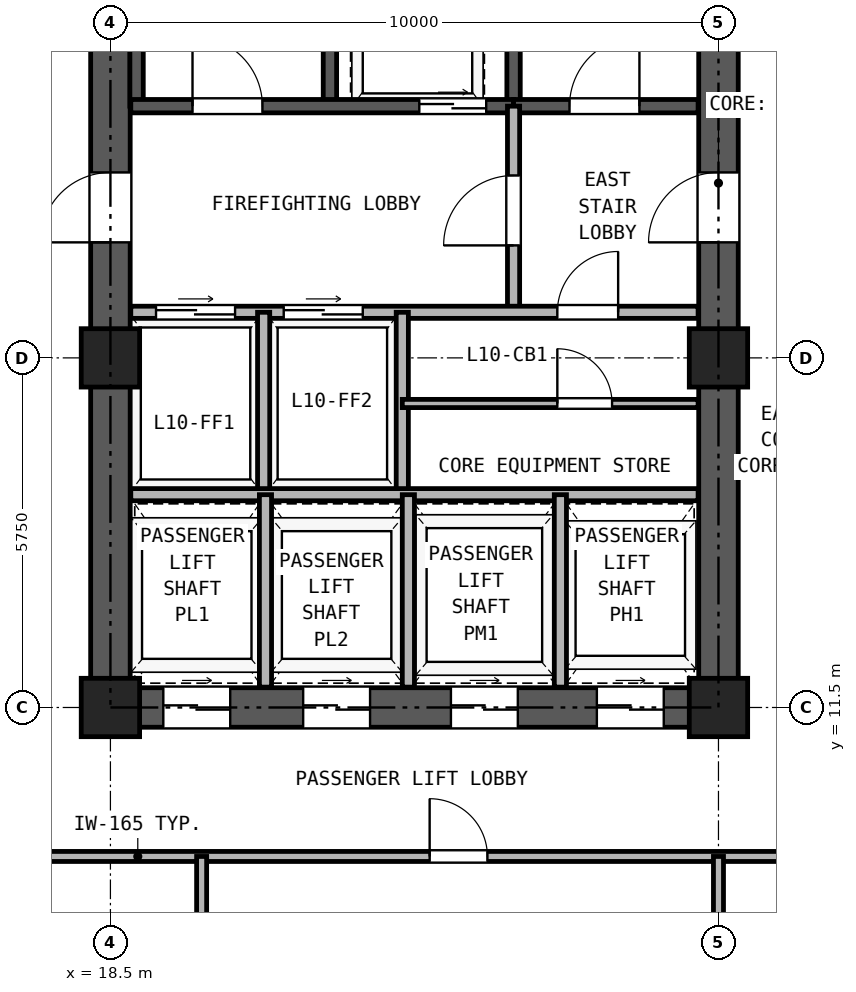
"""IFC4 building model, lengths in metres.
Left out: names, types, materials, properties, quantities, classifications, styles, units other than length and angle.
Written with IfcOpenShell. Run it as: python <this file> out.ifc"""

import sys

from ifc_helpers import new_model, si_unit, direction, frame, frame_2d, origin, origin_2d, place, context, subcontext, project, spatial, rectangle, hollow_rectangle, extrude, source, transform, mapped, element, fill, save


model = new_model("IFC4")
c1 = context("Model", 3, precision=1e-05, world=origin(), true_north=direction((0.0, 1.0)))
c2 = subcontext(c1, "Body", "Model", "MODEL_VIEW")
j1 = project(units=[si_unit("LENGTHUNIT", "METRE"), si_unit("PLANEANGLEUNIT", "RADIAN")], contexts=[c1])
p1 = place(None, origin())
s1 = spatial("IfcSite", under=j1, at=p1, CompositionType="ELEMENT")
p2 = place(p1, origin())
s2 = spatial("IfcBuilding", under=s1, at=p2, CompositionType="ELEMENT")
p3 = place(p2, frame((0.0, 0.0, 40.5)))
s3 = spatial("IfcBuildingStorey", under=s2, at=p3, CompositionType="ELEMENT", Elevation=40.5)
m1 = source(origin(), c2, "Body", "SweptSolid", [
    extrude(hollow_rectangle(XDim=0.96, YDim=0.96, WallThickness=0.06, at=origin_2d()), origin(), (0.0, 0.0, 1.0), 3.32),
])
for number, where, z_axis, x_axis in (
    (1, (18.5, 11.5, 0.0), (0.0, 0.0, 1.0), (1.0, 0.0, 0.0)),
    (2, (18.5, 17.25, 0.0), (0.0, 0.0, 1.0), (1.0, 0.0, 0.0)),
    (3, (28.5, 11.5, 0.0), (0.0, 0.0, 1.0), (1.0, 0.0, 0.0)),
    (4, (28.5, 17.25, 0.0), (0.0, 0.0, 1.0), (1.0, 0.0, 0.0)),
):
    element("IfcColumn", number, at=place(p3, frame(where, z_axis=z_axis, x_axis=x_axis)), inside=s3, PredefinedType="COLUMN", context=c2, shape_type="MappedRepresentation", body=[
        mapped(m1, transform((0.0, 0.0, 0.0), x_axis=(1.0, 0.0, 0.0), y_axis=(0.0, 1.0, 0.0), z_axis=(0.0, 0.0, 1.0), scale=1.0)),
    ])
p4 = place(p3, frame((18.175, 11.5, 0.0), z_axis=(0.0, 0.0, 1.0), x_axis=(1.0, 0.0, 0.0)))
e5 = element("IfcWall", 5, at=p4, inside=s3, PredefinedType="SHEAR", context=c2, shape_type="SweptSolid", body=[
    extrude(rectangle(XDim=10.65, YDim=0.65, at=frame_2d((5.325, 0.0))), origin(), (0.0, 0.0, 1.0), 3.32),
])
p5 = place(p4, frame((1.195, 0.0, 0.0)))
e6 = element("IfcOpeningElement", 6, at=p5, cuts=e5, PredefinedType="OPENING", context=c2, shape_type="SweptSolid", body=[
    extrude(rectangle(XDim=1.1, YDim=2.25, at=frame_2d((0.55, 1.125))), frame((0.0, 0.335, 0.0), z_axis=(0.0, -1.0, 0.0), x_axis=(1.0, 0.0, 0.0)), (0.0, 0.0, 1.0), 0.67),
])
p6 = place(p4, frame((3.495, 0.0, 0.0)))
e7 = element("IfcOpeningElement", 7, at=p6, cuts=e5, PredefinedType="OPENING", context=c2, shape_type="SweptSolid", body=[
    extrude(rectangle(XDim=1.1, YDim=2.25, at=frame_2d((0.55, 1.125))), frame((0.0, 0.335, 0.0), z_axis=(0.0, -1.0, 0.0), x_axis=(1.0, 0.0, 0.0)), (0.0, 0.0, 1.0), 0.67),
])
p7 = place(p4, frame((5.925, 0.0, 0.0)))
e8 = element("IfcOpeningElement", 8, at=p7, cuts=e5, PredefinedType="OPENING", context=c2, shape_type="SweptSolid", body=[
    extrude(rectangle(XDim=1.1, YDim=2.25, at=frame_2d((0.55, 1.125))), frame((0.0, 0.335, 0.0), z_axis=(0.0, -1.0, 0.0), x_axis=(1.0, 0.0, 0.0)), (0.0, 0.0, 1.0), 0.67),
])
p8 = place(p4, frame((8.325, 0.0, 0.0)))
e9 = element("IfcOpeningElement", 9, at=p8, cuts=e5, PredefinedType="OPENING", context=c2, shape_type="SweptSolid", body=[
    extrude(rectangle(XDim=1.1, YDim=2.25, at=frame_2d((0.55, 1.125))), frame((0.0, 0.335, 0.0), z_axis=(0.0, -1.0, 0.0), x_axis=(1.0, 0.0, 0.0)), (0.0, 0.0, 1.0), 0.67),
])
p9 = place(p3, frame((18.5, 11.825, 0.0), z_axis=(0.0, 0.0, 1.0), x_axis=(0.0, 1.0, 0.0)))
e10 = element("IfcWall", 10, at=p9, inside=s3, PredefinedType="SHEAR", context=c2, shape_type="SweptSolid", body=[
    extrude(rectangle(XDim=16.6, YDim=0.65, at=frame_2d((8.3, 0.0))), origin(), (0.0, 0.0, 1.0), 3.32),
])
p10 = place(p9, frame((7.325, 0.0, 0.0)))
e11 = element("IfcOpeningElement", 11, at=p10, cuts=e10, PredefinedType="OPENING", context=c2, shape_type="SweptSolid", body=[
    extrude(rectangle(XDim=1.15, YDim=2.2, at=frame_2d((0.575, 1.1))), frame((0.0, 0.335, 0.0), z_axis=(0.0, -1.0, 0.0), x_axis=(1.0, 0.0, 0.0)), (0.0, 0.0, 1.0), 0.67),
])
p11 = place(p3, frame((28.5, 11.825, 0.0), z_axis=(0.0, 0.0, 1.0), x_axis=(0.0, 1.0, 0.0)))
e12 = element("IfcWall", 12, at=p11, inside=s3, PredefinedType="SHEAR", context=c2, shape_type="SweptSolid", body=[
    extrude(rectangle(XDim=16.6, YDim=0.65, at=frame_2d((8.3, 0.0))), origin(), (0.0, 0.0, 1.0), 3.32),
])
p12 = place(p11, frame((7.325, 0.0, 0.0)))
e13 = element("IfcOpeningElement", 13, at=p12, cuts=e12, PredefinedType="OPENING", context=c2, shape_type="SweptSolid", body=[
    extrude(rectangle(XDim=1.15, YDim=2.2, at=frame_2d((0.575, 1.1))), frame((0.0, 0.335, 0.0), z_axis=(0.0, -1.0, 0.0), x_axis=(1.0, 0.0, 0.0)), (0.0, 0.0, 1.0), 0.67),
])
for number, where, z_axis, x_axis in (
    (14, (18.93, 21.39, 0.0), (0.0, 0.0, 1.0), (0.0, 1.0, 0.0)),
    (15, (22.11, 21.39, 0.0), (0.0, 0.0, 1.0), (0.0, 1.0, 0.0)),
    (16, (25.13, 21.39, 0.0), (0.0, 0.0, 1.0), (0.0, 1.0, 0.0)),
):
    element("IfcWall", number, at=place(p3, frame(where, z_axis=z_axis, x_axis=x_axis)), inside=s3, PredefinedType="SOLIDWALL", context=c2, shape_type="SweptSolid", body=[
        extrude(rectangle(XDim=7.11, YDim=0.22, at=frame_2d((3.555, 0.0))), origin(), (0.0, 0.0, 1.0), 3.32),
    ])
p13 = place(p3, frame((18.835, 21.39, 0.0), z_axis=(0.0, 0.0, 1.0), x_axis=(1.0, 0.0, 0.0)))
e17 = element("IfcWall", 17, at=p13, inside=s3, PredefinedType="SOLIDWALL", context=c2, shape_type="SweptSolid", body=[
    extrude(rectangle(XDim=6.295, YDim=0.22, at=frame_2d((3.147, 0.0))), origin(), (0.0, 0.0, 1.0), 3.32),
])
p14 = place(p13, frame((1.015, 0.0, 0.0)))
e18 = element("IfcOpeningElement", 18, at=p14, cuts=e17, PredefinedType="OPENING", context=c2, shape_type="SweptSolid", body=[
    extrude(rectangle(XDim=1.15, YDim=2.2, at=frame_2d((0.575, 1.1))), frame((0.0, 0.12, 0.0), z_axis=(0.0, -1.0, 0.0), x_axis=(1.0, 0.0, 0.0)), (0.0, 0.0, 1.0), 0.24),
])
p15 = place(p13, frame((4.745, 0.0, 0.0)))
e19 = element("IfcOpeningElement", 19, at=p15, cuts=e17, PredefinedType="OPENING", context=c2, shape_type="SweptSolid", body=[
    extrude(rectangle(XDim=1.1, YDim=2.25, at=frame_2d((0.55, 1.125))), frame((0.0, 0.12, 0.0), z_axis=(0.0, -1.0, 0.0), x_axis=(1.0, 0.0, 0.0)), (0.0, 0.0, 1.0), 0.24),
])
p16 = place(p3, frame((25.13, 21.39, 0.0), z_axis=(0.0, 0.0, 1.0), x_axis=(1.0, 0.0, 0.0)))
e20 = element("IfcWall", 20, at=p16, inside=s3, PredefinedType="SOLIDWALL", context=c2, shape_type="SweptSolid", body=[
    extrude(rectangle(XDim=3.035, YDim=0.22, at=frame_2d((1.518, 0.0))), origin(), (0.0, 0.0, 1.0), 3.32),
])
p17 = place(p16, frame((0.92, 0.0, 0.0)))
e21 = element("IfcOpeningElement", 21, at=p17, cuts=e20, PredefinedType="OPENING", context=c2, shape_type="SweptSolid", body=[
    extrude(rectangle(XDim=1.15, YDim=2.2, at=frame_2d((0.575, 1.1))), frame((0.0, 0.12, 0.0), z_axis=(0.0, -1.0, 0.0), x_axis=(1.0, 0.0, 0.0)), (0.0, 0.0, 1.0), 0.24),
])
p18 = place(p3, frame((25.13, 18.0, 0.0), z_axis=(0.0, 0.0, 1.0), x_axis=(0.0, 1.0, 0.0)))
e22 = element("IfcWall", 22, at=p18, inside=s3, PredefinedType="PARTITIONING", context=c2, shape_type="SweptSolid", body=[
    extrude(rectangle(XDim=3.39, YDim=0.2, at=frame_2d((1.695, 0.0))), origin(), (0.0, 0.0, 1.0), 3.32),
])
p19 = place(p18, frame((1.1, 0.0, 0.0)))
e23 = element("IfcOpeningElement", 23, at=p19, cuts=e22, PredefinedType="OPENING", context=c2, shape_type="SweptSolid", body=[
    extrude(rectangle(XDim=1.15, YDim=2.2, at=frame_2d((0.575, 1.1))), frame((0.0, 0.11, 0.0), z_axis=(0.0, -1.0, 0.0), x_axis=(1.0, 0.0, 0.0)), (0.0, 0.0, 1.0), 0.22),
])
p20 = place(p3, frame((18.835, 18.0, 0.0), z_axis=(0.0, 0.0, 1.0), x_axis=(1.0, 0.0, 0.0)))
e24 = element("IfcWall", 24, at=p20, inside=s3, PredefinedType="PARTITIONING", context=c2, shape_type="SweptSolid", body=[
    extrude(rectangle(XDim=9.33, YDim=0.2, at=frame_2d((4.665, 0.0))), origin(), (0.0, 0.0, 1.0), 3.32),
])
p21 = place(p20, frame((0.415, 0.0, 0.0)))
e25 = element("IfcOpeningElement", 25, at=p21, cuts=e24, PredefinedType="OPENING", context=c2, shape_type="SweptSolid", body=[
    extrude(rectangle(XDim=1.3, YDim=2.3, at=frame_2d((0.65, 1.15))), frame((0.0, 0.11, 0.0), z_axis=(0.0, -1.0, 0.0), x_axis=(1.0, 0.0, 0.0)), (0.0, 0.0, 1.0), 0.22),
])
p22 = place(p20, frame((2.515, 0.0, 0.0)))
e26 = element("IfcOpeningElement", 26, at=p22, cuts=e24, PredefinedType="OPENING", context=c2, shape_type="SweptSolid", body=[
    extrude(rectangle(XDim=1.3, YDim=2.3, at=frame_2d((0.65, 1.15))), frame((0.0, 0.11, 0.0), z_axis=(0.0, -1.0, 0.0), x_axis=(1.0, 0.0, 0.0)), (0.0, 0.0, 1.0), 0.22),
])
p23 = place(p20, frame((7.015, 0.0, 0.0)))
e27 = element("IfcOpeningElement", 27, at=p23, cuts=e24, PredefinedType="OPENING", context=c2, shape_type="SweptSolid", body=[
    extrude(rectangle(XDim=1.0, YDim=2.15, at=frame_2d((0.5, 1.075))), frame((0.0, 0.11, 0.0), z_axis=(0.0, -1.0, 0.0), x_axis=(1.0, 0.0, 0.0)), (0.0, 0.0, 1.0), 0.22),
])
for number, where, z_axis, x_axis in (
    (28, (21.02, 15.0, 0.0), (0.0, 0.0, 1.0), (0.0, 1.0, 0.0)),
    (29, (23.3, 15.0, 0.0), (0.0, 0.0, 1.0), (0.0, 1.0, 0.0)),
):
    element("IfcWall", number, at=place(p3, frame(where, z_axis=z_axis, x_axis=x_axis)), inside=s3, PredefinedType="PARTITIONING", context=c2, shape_type="SweptSolid", body=[
        extrude(rectangle(XDim=3.0, YDim=0.2, at=frame_2d((1.5, 0.0))), origin(), (0.0, 0.0, 1.0), 3.32),
    ])
p24 = place(p3, frame((18.835, 15.0, 0.0), z_axis=(0.0, 0.0, 1.0), x_axis=(1.0, 0.0, 0.0)))
e30 = element("IfcWall", 30, at=p24, inside=s3, PredefinedType="PARTITIONING", context=c2, shape_type="SweptSolid", body=[
    extrude(rectangle(XDim=9.33, YDim=0.2, at=frame_2d((4.665, 0.0))), origin(), (0.0, 0.0, 1.0), 3.32),
])
p25 = place(p3, frame((23.3, 16.5, 0.0), z_axis=(0.0, 0.0, 1.0), x_axis=(1.0, 0.0, 0.0)))
e31 = element("IfcWall", 31, at=p25, inside=s3, PredefinedType="PARTITIONING", context=c2, shape_type="SweptSolid", body=[
    extrude(rectangle(XDim=4.865, YDim=0.135, at=frame_2d((2.433, 0.0))), origin(), (0.0, 0.0, 1.0), 3.32),
])
p26 = place(p25, frame((2.55, 0.0, 0.0)))
e32 = element("IfcOpeningElement", 32, at=p26, cuts=e31, PredefinedType="OPENING", context=c2, shape_type="SweptSolid", body=[
    extrude(rectangle(XDim=0.9, YDim=2.05, at=frame_2d((0.45, 1.025))), frame((0.0, 0.077, 0.0), z_axis=(0.0, -1.0, 0.0), x_axis=(1.0, 0.0, 0.0)), (0.0, 0.0, 1.0), 0.155),
])
for number, where, z_axis, x_axis in (
    (33, (21.05, 11.835, 0.0), (0.0, 0.0, 1.0), (0.0, 1.0, 0.0)),
    (34, (23.4, 11.835, 0.0), (0.0, 0.0, 1.0), (0.0, 1.0, 0.0)),
    (35, (25.9, 11.835, 0.0), (0.0, 0.0, 1.0), (0.0, 1.0, 0.0)),
):
    element("IfcWall", number, at=place(p3, frame(where, z_axis=z_axis, x_axis=x_axis)), inside=s3, PredefinedType="PARTITIONING", context=c2, shape_type="SweptSolid", body=[
        extrude(rectangle(XDim=3.165, YDim=0.2, at=frame_2d((1.583, 0.0))), origin(), (0.0, 0.0, 1.0), 3.32),
    ])
p27 = place(p3, frame((7.4, 9.05, 0.0), z_axis=(0.0, 0.0, 1.0), x_axis=(1.0, 0.0, 0.0)))
e36 = element("IfcWall", 36, at=p27, inside=s3, PredefinedType="PARTITIONING", context=c2, shape_type="SweptSolid", body=[
    extrude(rectangle(XDim=32.2, YDim=0.165, at=frame_2d((16.1, 0.0))), origin(), (0.0, 0.0, 1.0), 3.32),
])
p28 = place(p27, frame((5.8, 0.0, 0.0)))
e37 = element("IfcOpeningElement", 37, at=p28, cuts=e36, PredefinedType="OPENING", context=c2, shape_type="SweptSolid", body=[
    extrude(rectangle(XDim=0.95, YDim=2.15, at=frame_2d((0.475, 1.075))), frame((0.0, 0.093, 0.0), z_axis=(0.0, -1.0, 0.0), x_axis=(1.0, 0.0, 0.0)), (0.0, 0.0, 1.0), 0.185),
])
p29 = place(p27, frame((16.35, 0.0, 0.0)))
e38 = element("IfcOpeningElement", 38, at=p29, cuts=e36, PredefinedType="OPENING", context=c2, shape_type="SweptSolid", body=[
    extrude(rectangle(XDim=0.95, YDim=2.15, at=frame_2d((0.475, 1.075))), frame((0.0, 0.093, 0.0), z_axis=(0.0, -1.0, 0.0), x_axis=(1.0, 0.0, 0.0)), (0.0, 0.0, 1.0), 0.185),
])
p30 = place(p27, frame((23.6, 0.0, 0.0)))
e39 = element("IfcOpeningElement", 39, at=p30, cuts=e36, PredefinedType="OPENING", context=c2, shape_type="SweptSolid", body=[
    extrude(rectangle(XDim=0.95, YDim=2.15, at=frame_2d((0.475, 1.075))), frame((0.0, 0.093, 0.0), z_axis=(0.0, -1.0, 0.0), x_axis=(1.0, 0.0, 0.0)), (0.0, 0.0, 1.0), 0.185),
])
p31 = place(p27, frame((27.95, 0.0, 0.0)))
e40 = element("IfcOpeningElement", 40, at=p31, cuts=e36, PredefinedType="OPENING", context=c2, shape_type="SweptSolid", body=[
    extrude(rectangle(XDim=0.92, YDim=2.1, at=frame_2d((0.46, 1.05))), frame((0.0, 0.093, 0.0), z_axis=(0.0, -1.0, 0.0), x_axis=(1.0, 0.0, 0.0)), (0.0, 0.0, 1.0), 0.185),
])
p32 = place(p27, frame((30.5, 0.0, 0.0)))
e41 = element("IfcOpeningElement", 41, at=p32, cuts=e36, PredefinedType="OPENING", context=c2, shape_type="SweptSolid", body=[
    extrude(rectangle(XDim=0.92, YDim=2.1, at=frame_2d((0.46, 1.05))), frame((0.0, 0.093, 0.0), z_axis=(0.0, -1.0, 0.0), x_axis=(1.0, 0.0, 0.0)), (0.0, 0.0, 1.0), 0.185),
])
p33 = place(p3, frame((20.0, 0.16, 0.0), z_axis=(0.0, 0.0, 1.0), x_axis=(0.0, 1.0, 0.0)))
e42 = element("IfcWall", 42, at=p33, inside=s3, PredefinedType="PARTITIONING", context=c2, shape_type="SweptSolid", body=[
    extrude(rectangle(XDim=8.89, YDim=0.165, at=frame_2d((4.445, 0.0))), origin(), (0.0, 0.0, 1.0), 3.32),
])
p34 = place(p3, frame((28.5, 0.16, 0.0), z_axis=(0.0, 0.0, 1.0), x_axis=(0.0, 1.0, 0.0)))
e43 = element("IfcWall", 43, at=p34, inside=s3, PredefinedType="PARTITIONING", context=c2, shape_type="SweptSolid", body=[
    extrude(rectangle(XDim=8.89, YDim=0.165, at=frame_2d((4.445, 0.0))), origin(), (0.0, 0.0, 1.0), 2.539),
])
p35 = place(p14, frame((1.15, 0.0, 0.0), z_axis=(0.0, 0.0, 1.0), x_axis=(-1.0, 0.0, 0.0)))
e44 = element("IfcDoor", 44, at=p35, inside=s3, OperationType="SINGLE_SWING_LEFT", PredefinedType="DOOR", context=c2, shape_type="SweptSolid", body=[
    extrude(rectangle(XDim=1.15, YDim=2.2, at=frame_2d((0.575, 1.1))), frame((0.0, 0.025, 0.0), z_axis=(0.0, -1.0, 0.0), x_axis=(1.0, 0.0, 0.0)), (0.0, 0.0, 1.0), 0.05),
])
fill(e18, e44)
p36 = place(p17, frame((1.15, 0.0, 0.0), z_axis=(0.0, 0.0, 1.0), x_axis=(-1.0, 0.0, 0.0)))
e45 = element("IfcDoor", 45, at=p36, inside=s3, OperationType="SINGLE_SWING_RIGHT", PredefinedType="DOOR", context=c2, shape_type="SweptSolid", body=[
    extrude(rectangle(XDim=1.15, YDim=2.2, at=frame_2d((0.575, 1.1))), frame((0.0, 0.025, 0.0), z_axis=(0.0, -1.0, 0.0), x_axis=(1.0, 0.0, 0.0)), (0.0, 0.0, 1.0), 0.05),
])
fill(e21, e45)
p37 = place(p15, frame((1.1, 0.0, 0.0), z_axis=(0.0, 0.0, 1.0), x_axis=(-1.0, 0.0, 0.0)))
e46 = element("IfcDoor", 46, at=p37, inside=s3, OperationType="DOUBLE_DOOR_SLIDING", PredefinedType="DOOR", context=c2, shape_type="SweptSolid", body=[
    extrude(rectangle(XDim=1.1, YDim=2.25, at=frame_2d((0.55, 1.125))), frame((0.0, 0.025, 0.0), z_axis=(0.0, -1.0, 0.0), x_axis=(1.0, 0.0, 0.0)), (0.0, 0.0, 1.0), 0.05),
])
fill(e19, e46)
p38 = place(p19, origin())
e47 = element("IfcDoor", 47, at=p38, inside=s3, OperationType="SINGLE_SWING_LEFT", PredefinedType="DOOR", context=c2, shape_type="SweptSolid", body=[
    extrude(rectangle(XDim=1.15, YDim=2.2, at=frame_2d((0.575, 1.1))), frame((0.0, 0.025, 0.0), z_axis=(0.0, -1.0, 0.0), x_axis=(1.0, 0.0, 0.0)), (0.0, 0.0, 1.0), 0.05),
])
fill(e23, e47)
p39 = place(p21, origin())
e48 = element("IfcDoor", 48, at=p39, inside=s3, OperationType="DOUBLE_DOOR_SLIDING", PredefinedType="DOOR", context=c2, shape_type="SweptSolid", body=[
    extrude(rectangle(XDim=1.3, YDim=2.3, at=frame_2d((0.65, 1.15))), frame((0.0, 0.025, 0.0), z_axis=(0.0, -1.0, 0.0), x_axis=(1.0, 0.0, 0.0)), (0.0, 0.0, 1.0), 0.05),
])
fill(e25, e48)
p40 = place(p22, origin())
e49 = element("IfcDoor", 49, at=p40, inside=s3, OperationType="DOUBLE_DOOR_SLIDING", PredefinedType="DOOR", context=c2, shape_type="SweptSolid", body=[
    extrude(rectangle(XDim=1.3, YDim=2.3, at=frame_2d((0.65, 1.15))), frame((0.0, 0.025, 0.0), z_axis=(0.0, -1.0, 0.0), x_axis=(1.0, 0.0, 0.0)), (0.0, 0.0, 1.0), 0.05),
])
fill(e26, e49)
p41 = place(p23, frame((1.0, 0.0, 0.0), z_axis=(0.0, 0.0, 1.0), x_axis=(-1.0, 0.0, 0.0)))
e50 = element("IfcDoor", 50, at=p41, inside=s3, OperationType="SINGLE_SWING_RIGHT", PredefinedType="DOOR", context=c2, shape_type="SweptSolid", body=[
    extrude(rectangle(XDim=1.0, YDim=2.15, at=frame_2d((0.5, 1.075))), frame((0.0, 0.025, 0.0), z_axis=(0.0, -1.0, 0.0), x_axis=(1.0, 0.0, 0.0)), (0.0, 0.0, 1.0), 0.05),
])
fill(e27, e50)
p42 = place(p26, frame((0.9, 0.0, 0.0), z_axis=(0.0, 0.0, 1.0), x_axis=(-1.0, 0.0, 0.0)))
e51 = element("IfcDoor", 51, at=p42, inside=s3, OperationType="SINGLE_SWING_LEFT", PredefinedType="DOOR", context=c2, shape_type="SweptSolid", body=[
    extrude(rectangle(XDim=0.9, YDim=2.05, at=frame_2d((0.45, 1.025))), frame((0.0, 0.025, 0.0), z_axis=(0.0, -1.0, 0.0), x_axis=(1.0, 0.0, 0.0)), (0.0, 0.0, 1.0), 0.05),
])
fill(e32, e51)
p43 = place(p10, frame((1.15, 0.0, 0.0), z_axis=(0.0, 0.0, 1.0), x_axis=(-1.0, 0.0, 0.0)))
e52 = element("IfcDoor", 52, at=p43, inside=s3, OperationType="SINGLE_SWING_LEFT", PredefinedType="DOOR", context=c2, shape_type="SweptSolid", body=[
    extrude(rectangle(XDim=1.15, YDim=2.2, at=frame_2d((0.575, 1.1))), frame((0.0, 0.025, 0.0), z_axis=(0.0, -1.0, 0.0), x_axis=(1.0, 0.0, 0.0)), (0.0, 0.0, 1.0), 0.05),
])
fill(e11, e52)
p44 = place(p12, origin())
e53 = element("IfcDoor", 53, at=p44, inside=s3, OperationType="SINGLE_SWING_LEFT", PredefinedType="DOOR", context=c2, shape_type="SweptSolid", body=[
    extrude(rectangle(XDim=1.15, YDim=2.2, at=frame_2d((0.575, 1.1))), frame((0.0, 0.025, 0.0), z_axis=(0.0, -1.0, 0.0), x_axis=(1.0, 0.0, 0.0)), (0.0, 0.0, 1.0), 0.05),
])
fill(e13, e53)
p45 = place(p5, frame((1.1, 0.0, 0.0), z_axis=(0.0, 0.0, 1.0), x_axis=(-1.0, 0.0, 0.0)))
e54 = element("IfcDoor", 54, at=p45, inside=s3, OperationType="DOUBLE_DOOR_SLIDING", PredefinedType="DOOR", context=c2, shape_type="SweptSolid", body=[
    extrude(rectangle(XDim=1.1, YDim=2.25, at=frame_2d((0.55, 1.125))), frame((0.0, 0.025, 0.0), z_axis=(0.0, -1.0, 0.0), x_axis=(1.0, 0.0, 0.0)), (0.0, 0.0, 1.0), 0.05),
])
fill(e6, e54)
p46 = place(p6, frame((1.1, 0.0, 0.0), z_axis=(0.0, 0.0, 1.0), x_axis=(-1.0, 0.0, 0.0)))
e55 = element("IfcDoor", 55, at=p46, inside=s3, OperationType="DOUBLE_DOOR_SLIDING", PredefinedType="DOOR", context=c2, shape_type="SweptSolid", body=[
    extrude(rectangle(XDim=1.1, YDim=2.25, at=frame_2d((0.55, 1.125))), frame((0.0, 0.025, 0.0), z_axis=(0.0, -1.0, 0.0), x_axis=(1.0, 0.0, 0.0)), (0.0, 0.0, 1.0), 0.05),
])
fill(e7, e55)
p47 = place(p7, frame((1.1, 0.0, 0.0), z_axis=(0.0, 0.0, 1.0), x_axis=(-1.0, 0.0, 0.0)))
e56 = element("IfcDoor", 56, at=p47, inside=s3, OperationType="DOUBLE_DOOR_SLIDING", PredefinedType="DOOR", context=c2, shape_type="SweptSolid", body=[
    extrude(rectangle(XDim=1.1, YDim=2.25, at=frame_2d((0.55, 1.125))), frame((0.0, 0.025, 0.0), z_axis=(0.0, -1.0, 0.0), x_axis=(1.0, 0.0, 0.0)), (0.0, 0.0, 1.0), 0.05),
])
fill(e8, e56)
p48 = place(p8, frame((1.1, 0.0, 0.0), z_axis=(0.0, 0.0, 1.0), x_axis=(-1.0, 0.0, 0.0)))
e57 = element("IfcDoor", 57, at=p48, inside=s3, OperationType="DOUBLE_DOOR_SLIDING", PredefinedType="DOOR", context=c2, shape_type="SweptSolid", body=[
    extrude(rectangle(XDim=1.1, YDim=2.25, at=frame_2d((0.55, 1.125))), frame((0.0, 0.025, 0.0), z_axis=(0.0, -1.0, 0.0), x_axis=(1.0, 0.0, 0.0)), (0.0, 0.0, 1.0), 0.05),
])
fill(e9, e57)
p49 = place(p29, frame((0.95, 0.0, 0.0), z_axis=(0.0, 0.0, 1.0), x_axis=(-1.0, 0.0, 0.0)))
e58 = element("IfcDoor", 58, at=p49, inside=s3, OperationType="SINGLE_SWING_LEFT", PredefinedType="DOOR", context=c2, shape_type="SweptSolid", body=[
    extrude(rectangle(XDim=0.95, YDim=2.15, at=frame_2d((0.475, 1.075))), frame((0.0, 0.025, 0.0), z_axis=(0.0, -1.0, 0.0), x_axis=(1.0, 0.0, 0.0)), (0.0, 0.0, 1.0), 0.05),
])
fill(e38, e58)
save(model, sys.argv[1])
